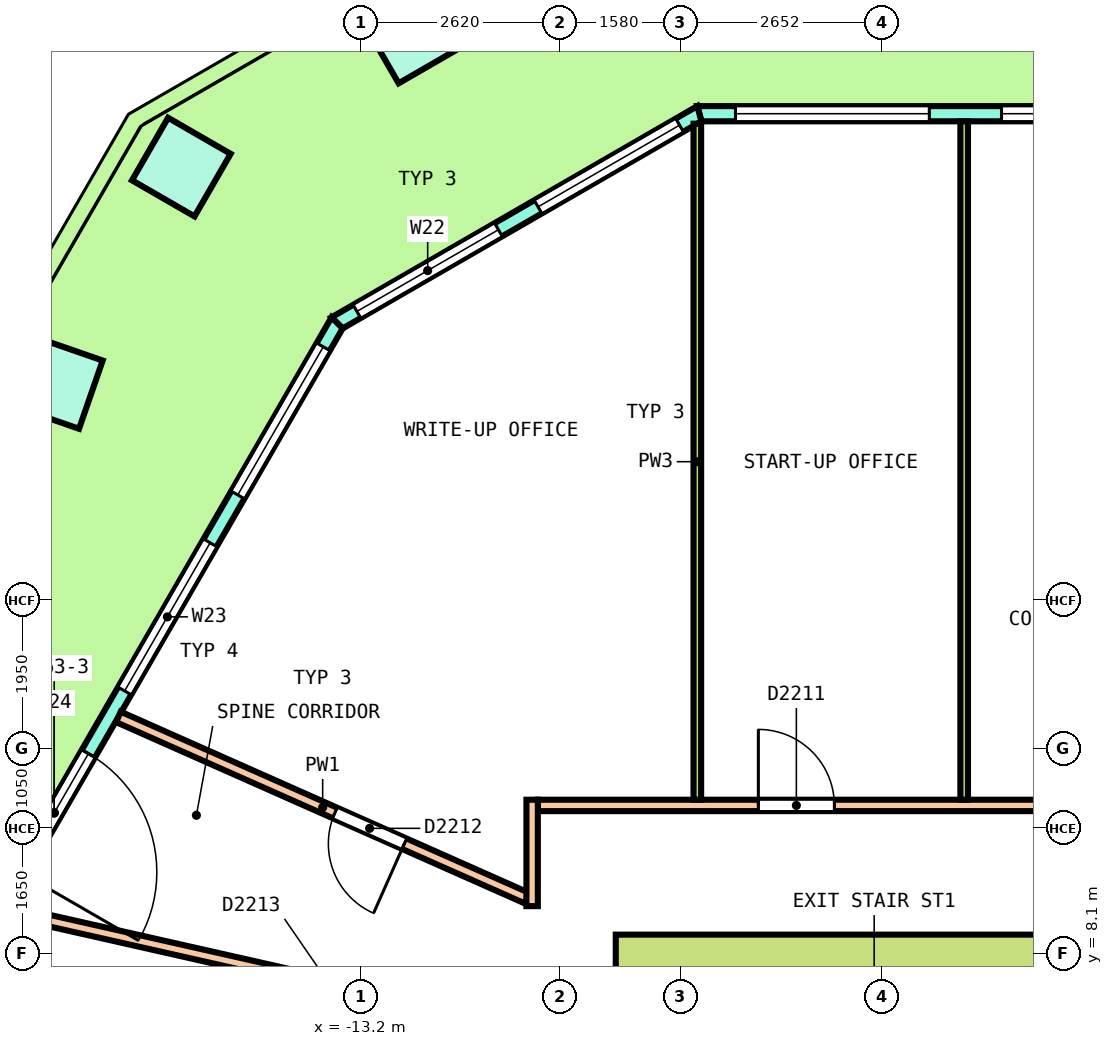
"""IFC4 building model, lengths in metres.
Left out: names, types, materials, properties, quantities, classifications, styles, units other than length and angle.
Written with IfcOpenShell. Run it as: python <this file> out.ifc"""

import sys

from ifc_helpers import new_model, si_unit, direction, frame, frame_2d, origin, origin_2d, place, context, subcontext, project, spatial, polyline, rectangle, outline, extrude, element, fill, save


model = new_model("IFC4")
c1 = context("Model", 3, precision=1e-05, world=origin(), true_north=direction((0.0, 1.0)))
c2 = subcontext(c1, "Body", "Model", "MODEL_VIEW")
j1 = project(units=[si_unit("LENGTHUNIT", "METRE"), si_unit("PLANEANGLEUNIT", "RADIAN")], contexts=[c1])
p1 = place(None, origin())
s1 = spatial("IfcSite", under=j1, at=p1, CompositionType="ELEMENT")
p2 = place(p1, origin())
s2 = spatial("IfcBuilding", under=s1, at=p2, CompositionType="ELEMENT")
p3 = place(p2, frame((0.0, 0.0, 287.0)))
s3 = spatial("IfcBuildingStorey", under=s2, at=p3, CompositionType="ELEMENT", Elevation=287.0)
for number, where, z_axis, x_axis in (
    (1, (-12.533, 20.199, 0.0), (-0.036, 0.0, 0.999), (-0.865, -0.5, -0.031)),
    (2, (-15.566, 18.448, 0.0), (-0.036, 0.0, 0.999), (-0.499, -0.866, -0.018)),
):
    element("IfcColumn", number, at=place(p3, frame(where, z_axis=z_axis, x_axis=x_axis)), inside=s3, PredefinedType="COLUMN", context=c2, shape_type="SweptSolid", body=[
        extrude(rectangle(XDim=0.95, YDim=0.95, at=origin_2d()), origin(), (0.0, 0.0, 1.0), 3.652),
    ])
p4 = place(p3, frame((-17.204, 15.61, 0.0), z_axis=(-0.032624119908, 0.006284154245, 0.999447935715), x_axis=(-0.500158635794, -0.8658654173, -0.01088201104)))
e3 = element("IfcColumn", 3, at=p4, inside=s3, PredefinedType="COLUMN", context=c2, shape_type="SweptSolid", body=[
    extrude(rectangle(XDim=0.95, YDim=0.95, at=origin_2d()), origin(), (0.0, 0.0, 1.0), 3.652),
])
p5 = place(p3, frame((8.75, 19.15, 0.0), z_axis=(0.0, 0.0, 1.0), x_axis=(-1.0, 0.0, 0.0)))
e4 = element("IfcWall", 4, at=p5, inside=s3, PredefinedType="SOLIDWALL", context=c2, shape_type="SweptSolid", body=[
    extrude(outline(polyline([(-0.027, -0.1), (1.006, -0.1), (2.038, -0.1), (3.071, -0.1), (4.103, -0.1), (5.136, -0.1), (6.168, -0.1), (7.201, -0.1), (8.233, -0.1), (9.266, -0.1), (10.299, -0.1), (11.331, -0.1), (12.364, -0.1), (13.396, -0.1), (14.429, -0.1), (15.461, -0.1), (16.494, -0.1), (17.526, -0.1), (17.473, 0.1), (16.447, 0.1), (15.42, 0.1), (14.394, 0.1), (13.368, 0.1), (12.342, 0.1), (11.315, 0.1), (10.289, 0.1), (9.263, 0.1), (8.237, 0.1), (7.21, 0.1), (6.184, 0.1), (5.158, 0.1), (4.132, 0.1), (3.105, 0.1), (2.079, 0.1), (1.053, 0.1), (0.027, 0.1), (-0.027, -0.1)])), origin(), (0.0, 0.0, 1.0), 3.7),
])
p6 = place(p5, frame((0.475, 0.0, 0.1)))
e5 = element("IfcOpeningElement", 5, at=p6, cuts=e4, PredefinedType="OPENING", context=c2, shape_type="SweptSolid", body=[
    extrude(rectangle(XDim=2.55, YDim=2.75, at=frame_2d((1.275, 1.375))), frame((0.0, 0.11, 0.0), z_axis=(0.0, -1.0, 0.0), x_axis=(1.0, 0.0, 0.0)), (0.0, 0.0, 1.0), 0.22),
])
p7 = place(p5, frame((3.975, 0.0, 0.1)))
e6 = element("IfcOpeningElement", 6, at=p7, cuts=e4, PredefinedType="OPENING", context=c2, shape_type="SweptSolid", body=[
    extrude(rectangle(XDim=2.55, YDim=2.75, at=frame_2d((1.275, 1.375))), frame((0.0, 0.11, 0.0), z_axis=(0.0, -1.0, 0.0), x_axis=(1.0, 0.0, 0.0)), (0.0, 0.0, 1.0), 0.22),
])
p8 = place(p5, frame((7.85, 0.0, 0.0)))
e7 = element("IfcOpeningElement", 7, at=p8, cuts=e4, PredefinedType="OPENING", context=c2, shape_type="SweptSolid", body=[
    extrude(rectangle(XDim=1.8, YDim=2.4, at=frame_2d((0.9, 1.2))), frame((0.0, 0.11, 0.0), z_axis=(0.0, -1.0, 0.0), x_axis=(1.0, 0.0, 0.0)), (0.0, 0.0, 1.0), 0.22),
])
p9 = place(p5, frame((7.85, 0.0, 2.55)))
e8 = element("IfcOpeningElement", 8, at=p9, cuts=e4, PredefinedType="OPENING", context=c2, shape_type="SweptSolid", body=[
    extrude(rectangle(XDim=1.8, YDim=0.3, at=frame_2d((0.9, 0.15))), frame((0.0, 0.11, 0.0), z_axis=(0.0, -1.0, 0.0), x_axis=(1.0, 0.0, 0.0)), (0.0, 0.0, 1.0), 0.22),
])
p10 = place(p5, frame((10.975, 0.0, 0.1)))
e9 = element("IfcOpeningElement", 9, at=p10, cuts=e4, PredefinedType="OPENING", context=c2, shape_type="SweptSolid", body=[
    extrude(rectangle(XDim=2.55, YDim=2.75, at=frame_2d((1.275, 1.375))), frame((0.0, 0.11, 0.0), z_axis=(0.0, -1.0, 0.0), x_axis=(1.0, 0.0, 0.0)), (0.0, 0.0, 1.0), 0.22),
])
p11 = place(p5, frame((14.475, 0.0, 0.1)))
e10 = element("IfcOpeningElement", 10, at=p11, cuts=e4, PredefinedType="OPENING", context=c2, shape_type="SweptSolid", body=[
    extrude(rectangle(XDim=2.55, YDim=2.75, at=frame_2d((1.275, 1.375))), frame((0.0, 0.11, 0.0), z_axis=(0.0, -1.0, 0.0), x_axis=(1.0, 0.0, 0.0)), (0.0, 0.0, 1.0), 0.22),
])
p12 = place(p3, frame((-8.75, 19.15, 0.0), z_axis=(0.0, 0.0, 1.0), x_axis=(-0.866026017613, -0.499998936816, 0.0)))
e11 = element("IfcWall", 11, at=p12, inside=s3, PredefinedType="SOLIDWALL", context=c2, shape_type="SweptSolid", body=[
    extrude(outline(polyline([(-0.027, -0.1), (1.084, -0.1), (2.196, -0.1), (3.307, -0.1), (4.419, -0.1), (5.53, -0.1), (5.477, 0.1), (4.387, 0.1), (3.297, 0.1), (2.207, 0.1), (1.117, 0.1), (0.027, 0.1), (-0.027, -0.1)])), origin(), (0.0, 0.0, 1.0), 3.7),
])
p13 = place(p12, frame((0.301, 0.0, 0.1)))
e12 = element("IfcOpeningElement", 12, at=p13, cuts=e11, PredefinedType="OPENING", context=c2, shape_type="SweptSolid", body=[
    extrude(rectangle(XDim=2.15, YDim=2.75, at=frame_2d((1.075, 1.375))), frame((0.0, 0.11, 0.0), z_axis=(0.0, -1.0, 0.0), x_axis=(1.0, 0.0, 0.0)), (0.0, 0.0, 1.0), 0.22),
])
p14 = place(p12, frame((3.052, 0.0, 0.1)))
e13 = element("IfcOpeningElement", 13, at=p14, cuts=e11, PredefinedType="OPENING", context=c2, shape_type="SweptSolid", body=[
    extrude(rectangle(XDim=2.15, YDim=2.75, at=frame_2d((1.075, 1.375))), frame((0.0, 0.11, 0.0), z_axis=(0.0, -1.0, 0.0), x_axis=(1.0, 0.0, 0.0)), (0.0, 0.0, 1.0), 0.22),
])
p15 = place(p3, frame((-13.516, 16.398, 0.0), z_axis=(0.0, 0.0, 1.0), x_axis=(-0.499998331335, -0.866026367187, 0.0)))
e14 = element("IfcWall", 14, at=p15, inside=s3, PredefinedType="SOLIDWALL", context=c2, shape_type="SweptSolid", body=[
    extrude(outline(polyline([(-0.027, -0.1), (1.04, -0.1), (2.107, -0.1), (3.175, -0.1), (4.242, -0.1), (5.309, -0.1), (6.376, -0.1), (7.443, -0.1), (8.51, -0.1), (9.578, -0.1), (10.645, -0.1), (11.712, -0.1), (12.779, -0.1), (13.846, -0.1), (14.914, -0.1), (14.86, 0.1), (13.8, 0.1), (12.741, 0.1), (11.681, 0.1), (10.622, 0.1), (9.562, 0.1), (8.503, 0.1), (7.443, 0.1), (6.384, 0.1), (5.324, 0.1), (4.265, 0.1), (3.205, 0.1), (2.146, 0.1), (1.086, 0.1), (0.027, 0.1), (-0.027, -0.1)])), origin(), (0.0, 0.0, 1.0), 3.7),
])
p16 = place(p15, frame((0.364, 0.0, 0.1)))
e15 = element("IfcOpeningElement", 15, at=p16, cuts=e14, PredefinedType="OPENING", context=c2, shape_type="SweptSolid", body=[
    extrude(rectangle(XDim=2.25, YDim=2.75, at=frame_2d((1.125, 1.375))), frame((0.0, 0.11, 0.0), z_axis=(0.0, -1.0, 0.0), x_axis=(1.0, 0.0, 0.0)), (0.0, 0.0, 1.0), 0.22),
])
p17 = place(p15, frame((3.341, 0.0, 0.1)))
e16 = element("IfcOpeningElement", 16, at=p17, cuts=e14, PredefinedType="OPENING", context=c2, shape_type="SweptSolid", body=[
    extrude(rectangle(XDim=2.25, YDim=2.75, at=frame_2d((1.125, 1.375))), frame((0.0, 0.11, 0.0), z_axis=(0.0, -1.0, 0.0), x_axis=(1.0, 0.0, 0.0)), (0.0, 0.0, 1.0), 0.22),
])
p18 = place(p15, frame((6.543, 0.0, 0.0)))
e17 = element("IfcOpeningElement", 17, at=p18, cuts=e14, PredefinedType="OPENING", context=c2, shape_type="SweptSolid", body=[
    extrude(rectangle(XDim=1.8, YDim=2.4, at=frame_2d((0.9, 1.2))), frame((0.0, 0.11, 0.0), z_axis=(0.0, -1.0, 0.0), x_axis=(1.0, 0.0, 0.0)), (0.0, 0.0, 1.0), 0.22),
])
p19 = place(p15, frame((6.543, 0.0, 2.55)))
e18 = element("IfcOpeningElement", 18, at=p19, cuts=e14, PredefinedType="OPENING", context=c2, shape_type="SweptSolid", body=[
    extrude(rectangle(XDim=1.8, YDim=0.3, at=frame_2d((0.9, 0.15))), frame((0.0, 0.11, 0.0), z_axis=(0.0, -1.0, 0.0), x_axis=(1.0, 0.0, 0.0)), (0.0, 0.0, 1.0), 0.22),
])
p20 = place(p15, frame((9.296, 0.0, 0.1)))
e19 = element("IfcOpeningElement", 19, at=p20, cuts=e14, PredefinedType="OPENING", context=c2, shape_type="SweptSolid", body=[
    extrude(rectangle(XDim=2.25, YDim=2.75, at=frame_2d((1.125, 1.375))), frame((0.0, 0.11, 0.0), z_axis=(0.0, -1.0, 0.0), x_axis=(1.0, 0.0, 0.0)), (0.0, 0.0, 1.0), 0.22),
])
p21 = place(p15, frame((12.273, 0.0, 0.1)))
e20 = element("IfcOpeningElement", 20, at=p21, cuts=e14, PredefinedType="OPENING", context=c2, shape_type="SweptSolid", body=[
    extrude(rectangle(XDim=2.25, YDim=2.75, at=frame_2d((1.125, 1.375))), frame((0.0, 0.11, 0.0), z_axis=(0.0, -1.0, 0.0), x_axis=(1.0, 0.0, 0.0)), (0.0, 0.0, 1.0), 0.22),
])
p22 = place(p3, frame((-9.85, 8.1, 0.0), z_axis=(0.0, 0.0, 1.0), x_axis=(1.0, 0.0, 0.0)))
e21 = element("IfcWall", 21, at=p22, inside=s3, PredefinedType="SHEAR", context=c2, shape_type="SweptSolid", body=[
    extrude(rectangle(XDim=19.7, YDim=0.5, at=frame_2d((9.85, 0.0))), origin(), (0.0, 0.0, 1.0), 3.7),
])
p23 = place(p22, frame((10.775, 0.0, 0.0)))
e22 = element("IfcOpeningElement", 22, at=p23, cuts=e21, PredefinedType="OPENING", context=c2, shape_type="SweptSolid", body=[
    extrude(rectangle(XDim=1.4, YDim=2.1, at=frame_2d((0.7, 1.05))), frame((0.0, 0.26, 0.0), z_axis=(0.0, -1.0, 0.0), x_axis=(1.0, 0.0, 0.0)), (0.0, 0.0, 1.0), 0.52),
])
p24 = place(p3, frame((-16.393, 11.214, 0.0), z_axis=(0.0, 0.0, 1.0), x_axis=(0.914110944559, -0.405464155059, 0.0)))
e23 = element("IfcWall", 23, at=p24, inside=s3, PredefinedType="PARTITIONING", context=c2, shape_type="SweptSolid", body=[
    extrude(rectangle(XDim=5.88, YDim=0.15, at=frame_2d((2.94, 0.0))), origin(), (0.0, 0.0, 1.0), 2.9),
])
p25 = place(p24, frame((3.115, 0.0, 0.0)))
e24 = element("IfcOpeningElement", 24, at=p25, cuts=e23, PredefinedType="OPENING", context=c2, shape_type="SweptSolid", body=[
    extrude(rectangle(XDim=1.0, YDim=2.1, at=frame_2d((0.5, 1.05))), frame((0.0, 0.085, 0.0), z_axis=(0.0, -1.0, 0.0), x_axis=(1.0, 0.0, 0.0)), (0.0, 0.0, 1.0), 0.17),
])
p26 = place(p3, frame((-17.867, 8.662, 0.0), z_axis=(0.0, 0.0, 1.0), x_axis=(0.975432078053, -0.220300388347, 0.0)))
e25 = element("IfcWall", 25, at=p26, inside=s3, PredefinedType="PARTITIONING", context=c2, shape_type="SweptSolid", body=[
    extrude(rectangle(XDim=7.016, YDim=0.15, at=frame_2d((3.508, 0.0))), origin(), (0.0, 0.0, 1.0), 2.9),
])
p27 = place(p26, frame((3.854, 0.0, 0.0)))
e26 = element("IfcOpeningElement", 26, at=p27, cuts=e25, PredefinedType="OPENING", context=c2, shape_type="SweptSolid", body=[
    extrude(rectangle(XDim=1.0, YDim=2.1, at=frame_2d((0.5, 1.05))), frame((0.0, 0.085, 0.0), z_axis=(0.0, -1.0, 0.0), x_axis=(1.0, 0.0, 0.0)), (0.0, 0.0, 1.0), 0.17),
])
p28 = place(p3, frame((-10.875, 10.05, 0.0), z_axis=(0.0, 0.0, 1.0), x_axis=(1.0, 0.0, 0.0)))
e27 = element("IfcWall", 27, at=p28, inside=s3, PredefinedType="PARTITIONING", context=c2, shape_type="SweptSolid", body=[
    extrude(rectangle(XDim=21.775, YDim=0.15, at=frame_2d((10.887, 0.0))), origin(), (0.0, 0.0, 1.0), 2.9),
])
p29 = place(p28, frame((20.309, 0.0, 0.0)))
e28 = element("IfcOpeningElement", 28, at=p29, cuts=e27, PredefinedType="OPENING", context=c2, shape_type="SweptSolid", body=[
    extrude(rectangle(XDim=1.0, YDim=2.1, at=frame_2d((0.5, 1.05))), frame((0.0, 0.085, 0.0), z_axis=(0.0, -1.0, 0.0), x_axis=(1.0, 0.0, 0.0)), (0.0, 0.0, 1.0), 0.17),
])
p30 = place(p28, frame((16.309, 0.0, 0.0)))
e29 = element("IfcOpeningElement", 29, at=p30, cuts=e27, PredefinedType="OPENING", context=c2, shape_type="SweptSolid", body=[
    extrude(rectangle(XDim=1.2, YDim=2.1, at=frame_2d((0.6, 1.05))), frame((0.0, 0.085, 0.0), z_axis=(0.0, -1.0, 0.0), x_axis=(1.0, 0.0, 0.0)), (0.0, 0.0, 1.0), 0.17),
])
p31 = place(p28, frame((7.751, 0.0, 0.0)))
e30 = element("IfcOpeningElement", 30, at=p31, cuts=e27, PredefinedType="OPENING", context=c2, shape_type="SweptSolid", body=[
    extrude(rectangle(XDim=1.2, YDim=2.1, at=frame_2d((0.6, 1.05))), frame((0.0, 0.085, 0.0), z_axis=(0.0, -1.0, 0.0), x_axis=(1.0, 0.0, 0.0)), (0.0, 0.0, 1.0), 0.17),
])
p32 = place(p28, frame((2.901, 0.0, 0.0)))
e31 = element("IfcOpeningElement", 31, at=p32, cuts=e27, PredefinedType="OPENING", context=c2, shape_type="SweptSolid", body=[
    extrude(rectangle(XDim=1.0, YDim=2.1, at=frame_2d((0.5, 1.05))), frame((0.0, 0.085, 0.0), z_axis=(0.0, -1.0, 0.0), x_axis=(1.0, 0.0, 0.0)), (0.0, 0.0, 1.0), 0.17),
])
p33 = place(p3, frame((-10.95, 8.725, 0.0), z_axis=(0.0, 0.0, 1.0), x_axis=(0.0, 1.0, 0.0)))
e32 = element("IfcWall", 32, at=p33, inside=s3, PredefinedType="PARTITIONING", context=c2, shape_type="SweptSolid", body=[
    extrude(rectangle(XDim=1.4, YDim=0.15, at=frame_2d((0.7, 0.0))), origin(), (0.0, 0.0, 1.0), 2.9),
])
p34 = place(p3, frame((-5.266, 10.125, 0.0), z_axis=(0.0, 0.0, 1.0), x_axis=(0.0, 1.0, 0.0)))
e33 = element("IfcWall", 33, at=p34, inside=s3, PredefinedType="PARTITIONING", context=c2, shape_type="SweptSolid", body=[
    extrude(rectangle(XDim=8.925, YDim=0.1, at=frame_2d((4.462, 0.0))), origin(), (0.0, 0.0, 1.0), 2.9),
])
p35 = place(p3, frame((-8.777, 10.125, 0.0), z_axis=(0.0, 0.0, 1.0), x_axis=(0.0, 1.0, 0.0)))
e34 = element("IfcWall", 34, at=p35, inside=s3, PredefinedType="PARTITIONING", context=c2, shape_type="SweptSolid", body=[
    extrude(rectangle(XDim=8.894, YDim=0.1, at=frame_2d((4.447, 0.0))), origin(), (0.0, 0.0, 1.0), 2.9),
])
p36 = place(p10, origin())
e35 = element("IfcWindow", 35, at=p36, inside=s3, PartitioningType="SINGLE_PANEL", PredefinedType="WINDOW", context=c2, shape_type="SweptSolid", body=[
    extrude(rectangle(XDim=2.55, YDim=2.75, at=frame_2d((1.275, 1.375))), frame((0.0, 0.03, 0.0), z_axis=(0.0, -1.0, 0.0), x_axis=(1.0, 0.0, 0.0)), (0.0, 0.0, 1.0), 0.06),
])
fill(e9, e35)
p37 = place(p11, origin())
e36 = element("IfcWindow", 36, at=p37, inside=s3, PartitioningType="SINGLE_PANEL", PredefinedType="WINDOW", context=c2, shape_type="SweptSolid", body=[
    extrude(rectangle(XDim=2.55, YDim=2.75, at=frame_2d((1.275, 1.375))), frame((0.0, 0.03, 0.0), z_axis=(0.0, -1.0, 0.0), x_axis=(1.0, 0.0, 0.0)), (0.0, 0.0, 1.0), 0.06),
])
fill(e10, e36)
p38 = place(p13, origin())
e37 = element("IfcWindow", 37, at=p38, inside=s3, PartitioningType="SINGLE_PANEL", PredefinedType="WINDOW", context=c2, shape_type="SweptSolid", body=[
    extrude(rectangle(XDim=2.15, YDim=2.75, at=frame_2d((1.075, 1.375))), frame((0.0, 0.03, 0.0), z_axis=(0.0, -1.0, 0.0), x_axis=(1.0, 0.0, 0.0)), (0.0, 0.0, 1.0), 0.06),
])
fill(e12, e37)
p39 = place(p14, origin())
e38 = element("IfcWindow", 38, at=p39, inside=s3, PartitioningType="SINGLE_PANEL", PredefinedType="WINDOW", context=c2, shape_type="SweptSolid", body=[
    extrude(rectangle(XDim=2.15, YDim=2.75, at=frame_2d((1.075, 1.375))), frame((0.0, 0.03, 0.0), z_axis=(0.0, -1.0, 0.0), x_axis=(1.0, 0.0, 0.0)), (0.0, 0.0, 1.0), 0.06),
])
fill(e13, e38)
p40 = place(p16, origin())
e39 = element("IfcWindow", 39, at=p40, inside=s3, PartitioningType="SINGLE_PANEL", PredefinedType="WINDOW", context=c2, shape_type="SweptSolid", body=[
    extrude(rectangle(XDim=2.25, YDim=2.75, at=frame_2d((1.125, 1.375))), frame((0.0, 0.03, 0.0), z_axis=(0.0, -1.0, 0.0), x_axis=(1.0, 0.0, 0.0)), (0.0, 0.0, 1.0), 0.06),
])
fill(e15, e39)
p41 = place(p17, origin())
e40 = element("IfcWindow", 40, at=p41, inside=s3, PartitioningType="SINGLE_PANEL", PredefinedType="WINDOW", context=c2, shape_type="SweptSolid", body=[
    extrude(rectangle(XDim=2.25, YDim=2.75, at=frame_2d((1.125, 1.375))), frame((0.0, 0.03, 0.0), z_axis=(0.0, -1.0, 0.0), x_axis=(1.0, 0.0, 0.0)), (0.0, 0.0, 1.0), 0.06),
])
fill(e16, e40)
p42 = place(p18, origin())
e41 = element("IfcDoor", 41, at=p42, inside=s3, OperationType="DOUBLE_DOOR_SINGLE_SWING", PredefinedType="DOOR", context=c2, shape_type="SweptSolid", body=[
    extrude(rectangle(XDim=1.8, YDim=2.4, at=frame_2d((0.9, 1.2))), frame((0.0, 0.025, 0.0), z_axis=(0.0, -1.0, 0.0), x_axis=(1.0, 0.0, 0.0)), (0.0, 0.0, 1.0), 0.05),
])
fill(e17, e41)
p43 = place(p19, origin())
e42 = element("IfcWindow", 42, at=p43, inside=s3, PartitioningType="SINGLE_PANEL", PredefinedType="WINDOW", context=c2, shape_type="SweptSolid", body=[
    extrude(rectangle(XDim=1.8, YDim=0.3, at=frame_2d((0.9, 0.15))), frame((0.0, 0.03, 0.0), z_axis=(0.0, -1.0, 0.0), x_axis=(1.0, 0.0, 0.0)), (0.0, 0.0, 1.0), 0.06),
])
fill(e18, e42)
p44 = place(p32, origin())
e43 = element("IfcDoor", 43, at=p44, inside=s3, OperationType="SINGLE_SWING_RIGHT", PredefinedType="DOOR", context=c2, shape_type="SweptSolid", body=[
    extrude(rectangle(XDim=1.0, YDim=2.1, at=frame_2d((0.5, 1.05))), frame((0.0, 0.025, 0.0), z_axis=(0.0, -1.0, 0.0), x_axis=(1.0, 0.0, 0.0)), (0.0, 0.0, 1.0), 0.05),
])
fill(e31, e43)
p45 = place(p25, origin())
e44 = element("IfcDoor", 44, at=p45, inside=s3, OperationType="SINGLE_SWING_LEFT", PredefinedType="DOOR", context=c2, shape_type="SweptSolid", body=[
    extrude(rectangle(XDim=1.0, YDim=2.1, at=frame_2d((0.5, 1.05))), frame((0.0, 0.025, 0.0), z_axis=(0.0, -1.0, 0.0), x_axis=(1.0, 0.0, 0.0)), (0.0, 0.0, 1.0), 0.05),
])
fill(e24, e44)
save(model, sys.argv[1])
